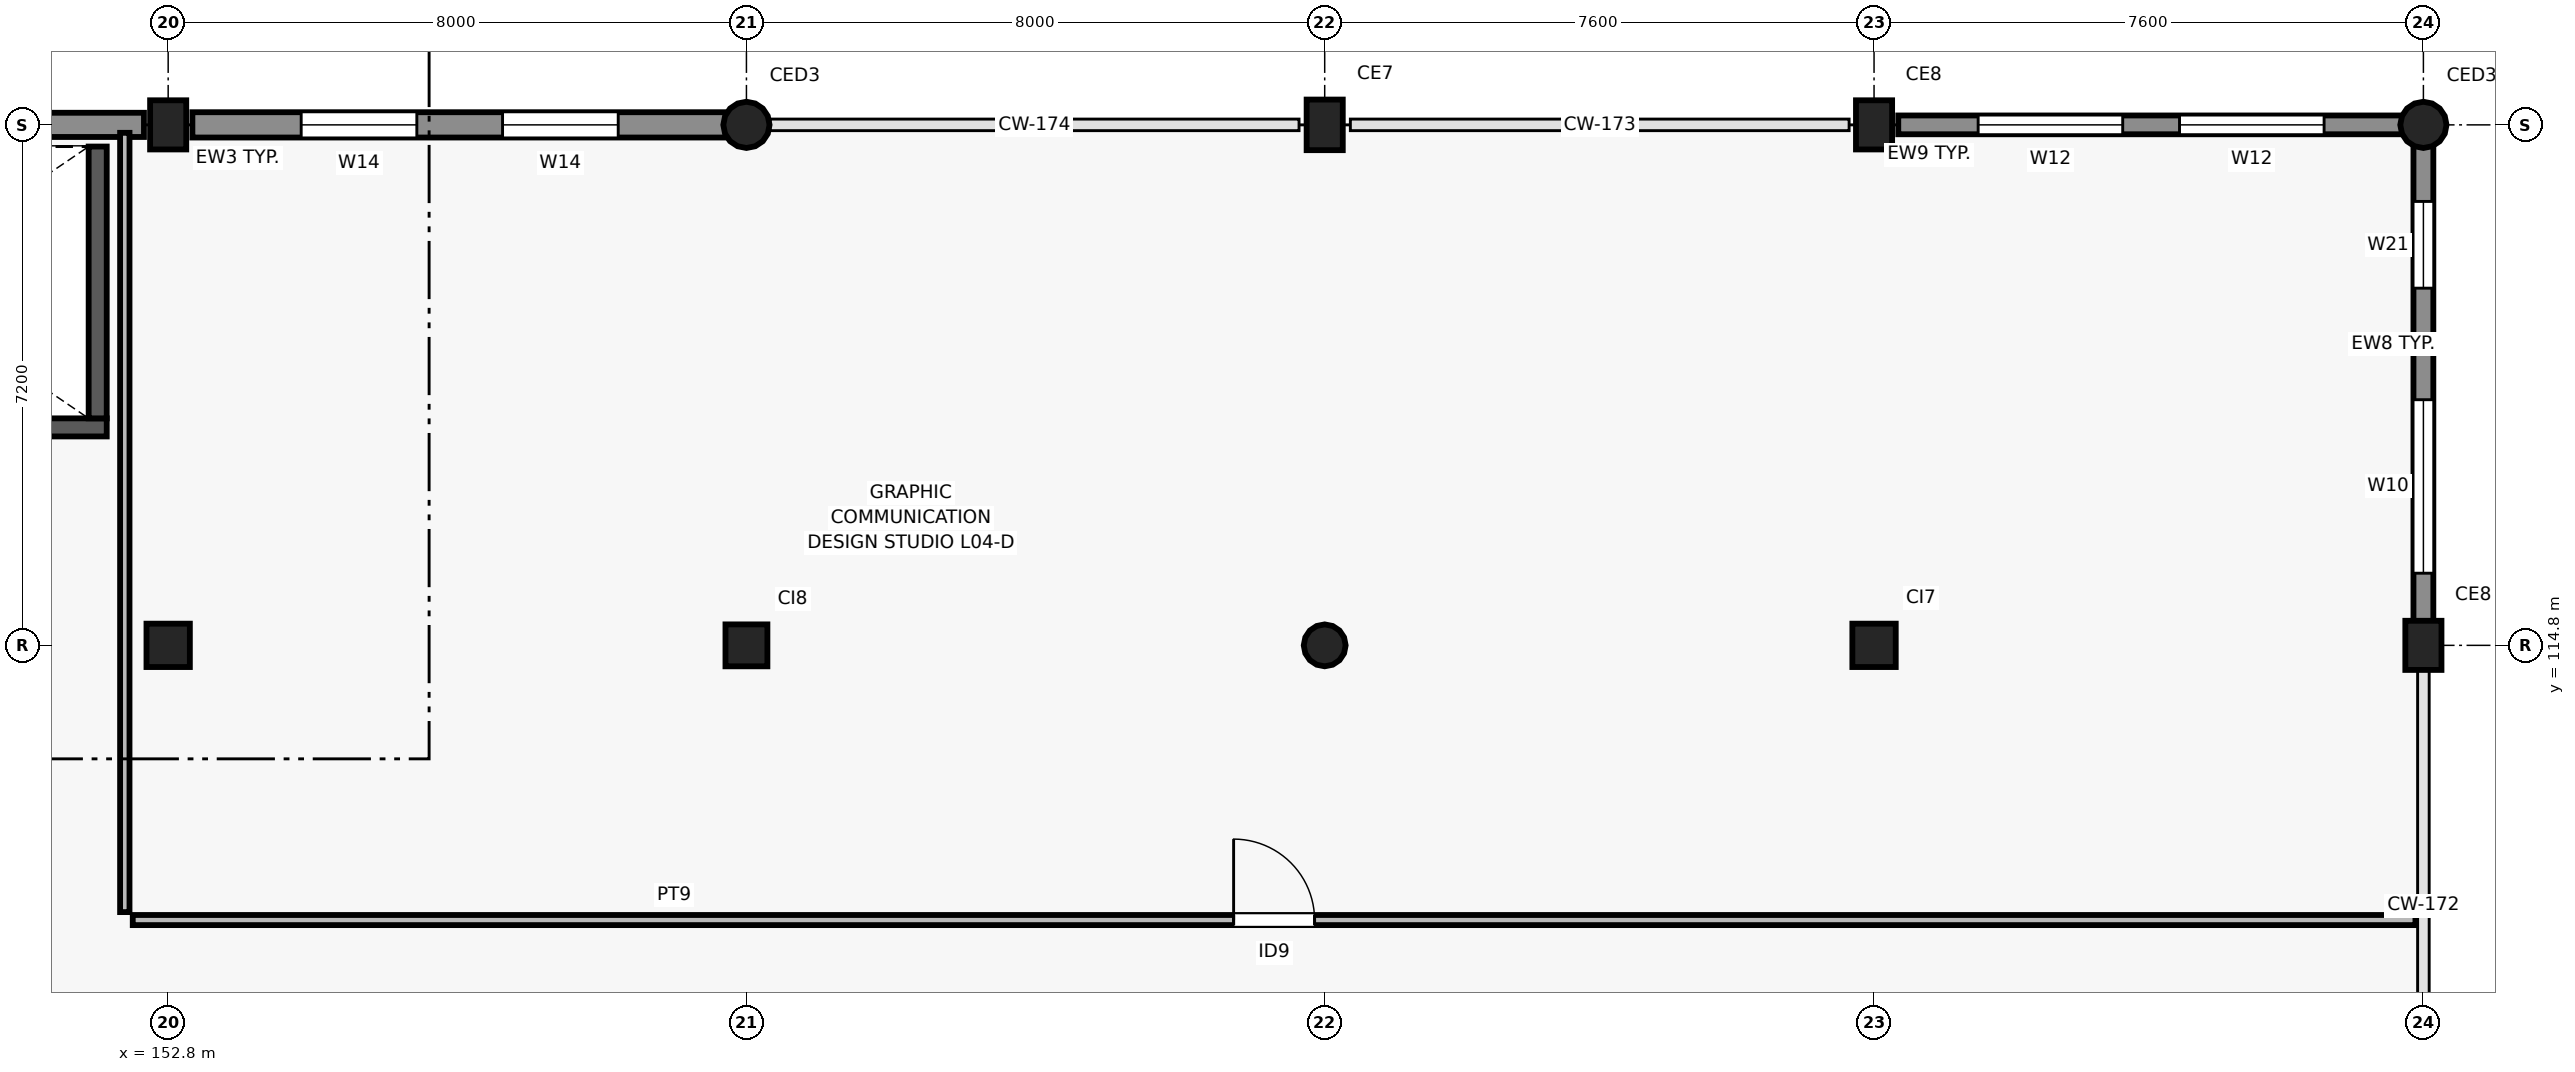
"""IFC4 building model, lengths in metres.
Left out: names, types, materials, properties, quantities, classifications, styles, units other than length and angle.
Written with IfcOpenShell. Run it as: python <this file> out.ifc"""

import sys

from ifc_helpers import new_model, si_unit, direction, frame, frame_2d, origin, origin_2d, place, context, subcontext, project, spatial, rectangle, circle, extrude, element, fill, save


model = new_model("IFC4")
c1 = context("Model", 3, precision=1e-05, world=origin(), true_north=direction((0.0, 1.0)))
c2 = subcontext(c1, "Body", "Model", "MODEL_VIEW")
j1 = project(units=[si_unit("LENGTHUNIT", "METRE"), si_unit("PLANEANGLEUNIT", "RADIAN")], contexts=[c1])
p1 = place(None, origin())
s1 = spatial("IfcSite", under=j1, at=p1, CompositionType="ELEMENT")
p2 = place(p1, origin())
s2 = spatial("IfcBuilding", under=s1, at=p2, CompositionType="ELEMENT")
p3 = place(p2, frame((0.0, 0.0, 17.4)))
s3 = spatial("IfcBuildingStorey", under=s2, at=p3, CompositionType="ELEMENT", Elevation=17.4)
p4 = place(p3, frame((152.8, 114.8, 0.0), z_axis=(0.0, 0.0, 1.0), x_axis=(1.0, 0.0, 0.0)))
e1 = element("IfcColumn", 1, at=p4, inside=s3, PredefinedType="COLUMN", context=c2, shape_type="SweptSolid", body=[
    extrude(rectangle(XDim=0.6, YDim=0.6, at=origin_2d()), origin(), (0.0, 0.0, 1.0), 4.2),
])
p5 = place(p3, frame((152.8, 122.0, 0.0), z_axis=(0.0, 0.0, 1.0), x_axis=(1.0, 0.0, 0.0)))
e2 = element("IfcColumn", 2, at=p5, inside=s3, PredefinedType="COLUMN", context=c2, shape_type="SweptSolid", body=[
    extrude(rectangle(XDim=0.68, YDim=0.5, at=origin_2d()), origin(), (0.0, 0.0, 1.0), 4.2),
])
p6 = place(p3, frame((160.8, 114.8, 0.0), z_axis=(0.0, 0.0, 1.0), x_axis=(1.0, 0.0, 0.0)))
e3 = element("IfcColumn", 3, at=p6, inside=s3, PredefinedType="COLUMN", context=c2, shape_type="SweptSolid", body=[
    extrude(rectangle(XDim=0.58, YDim=0.58, at=origin_2d()), origin(), (0.0, 0.0, 1.0), 4.2),
])
p7 = place(p3, frame((160.8, 122.0, 0.0), z_axis=(0.0, 0.0, 1.0), x_axis=(1.0, 0.0, 0.0)))
e4 = element("IfcColumn", 4, at=p7, inside=s3, PredefinedType="COLUMN", context=c2, shape_type="SweptSolid", body=[
    extrude(circle(Radius=0.32, at=origin_2d()), origin(), (0.0, 0.0, 1.0), 4.2),
])
p8 = place(p3, frame((168.8, 114.8, 0.0), z_axis=(0.0, 0.0, 1.0), x_axis=(1.0, 0.0, 0.0)))
e5 = element("IfcColumn", 5, at=p8, inside=s3, PredefinedType="COLUMN", context=c2, shape_type="SweptSolid", body=[
    extrude(circle(Radius=0.29, at=origin_2d()), origin(), (0.0, 0.0, 1.0), 4.2),
])
p9 = place(p3, frame((168.8, 122.0, 0.0), z_axis=(0.0, 0.0, 1.0), x_axis=(1.0, 0.0, 0.0)))
e6 = element("IfcColumn", 6, at=p9, inside=s3, PredefinedType="COLUMN", context=c2, shape_type="SweptSolid", body=[
    extrude(rectangle(XDim=0.7, YDim=0.5, at=origin_2d()), origin(), (0.0, 0.0, 1.0), 4.2),
])
p10 = place(p3, frame((176.4, 114.8, 0.0), z_axis=(0.0, 0.0, 1.0), x_axis=(1.0, 0.0, 0.0)))
e7 = element("IfcColumn", 7, at=p10, inside=s3, PredefinedType="COLUMN", context=c2, shape_type="SweptSolid", body=[
    extrude(rectangle(XDim=0.6, YDim=0.6, at=origin_2d()), origin(), (0.0, 0.0, 1.0), 4.2),
])
for number, where, z_axis, x_axis in (
    (8, (176.4, 122.0, 0.0), (0.0, 0.0, 1.0), (1.0, 0.0, 0.0)),
    (9, (184.0, 114.8, 0.0), (0.0, 0.0, 1.0), (1.0, 0.0, 0.0)),
):
    element("IfcColumn", number, at=place(p3, frame(where, z_axis=z_axis, x_axis=x_axis)), inside=s3, PredefinedType="COLUMN", context=c2, shape_type="SweptSolid", body=[
        extrude(rectangle(XDim=0.68, YDim=0.5, at=origin_2d()), origin(), (0.0, 0.0, 1.0), 4.2),
    ])
p11 = place(p3, frame((184.0, 122.0, 0.0), z_axis=(0.0, 0.0, 1.0), x_axis=(1.0, 0.0, 0.0)))
e10 = element("IfcColumn", 10, at=p11, inside=s3, PredefinedType="COLUMN", context=c2, shape_type="SweptSolid", body=[
    extrude(circle(Radius=0.32, at=origin_2d()), origin(), (0.0, 0.0, 1.0), 4.2),
])
p12 = place(p3, frame((184.0, 115.045, 0.0), z_axis=(0.0, 0.0, 1.0), x_axis=(0.0, 1.0, 0.0)))
e11 = element("IfcWall", 11, at=p12, inside=s3, PredefinedType="SOLIDWALL", context=c2, shape_type="SweptSolid", body=[
    extrude(rectangle(XDim=6.686, YDim=0.275, at=frame_2d((3.343, 0.0))), origin(), (0.0, 0.0, 1.0), 3.39),
])
p13 = place(p12, frame((0.753, 0.0, 0.9)))
e12 = element("IfcOpeningElement", 12, at=p13, cuts=e11, PredefinedType="OPENING", context=c2, shape_type="SweptSolid", body=[
    extrude(rectangle(XDim=2.4, YDim=1.5, at=frame_2d((1.2, 0.75))), frame((0.0, 0.147, 0.0), z_axis=(0.0, -1.0, 0.0), x_axis=(1.0, 0.0, 0.0)), (0.0, 0.0, 1.0), 0.295),
])
p14 = place(p12, frame((4.696, 0.0, 0.9)))
e13 = element("IfcOpeningElement", 13, at=p14, cuts=e11, PredefinedType="OPENING", context=c2, shape_type="SweptSolid", body=[
    extrude(rectangle(XDim=1.2, YDim=1.25, at=frame_2d((0.6, 0.625))), frame((0.0, 0.147, 0.0), z_axis=(0.0, -1.0, 0.0), x_axis=(1.0, 0.0, 0.0)), (0.0, 0.0, 1.0), 0.295),
])
p15 = place(p3, frame((183.731, 122.0, 0.0), z_axis=(0.0, 0.0, 1.0), x_axis=(-1.0, 0.0, 0.0)))
e14 = element("IfcWall", 14, at=p15, inside=s3, PredefinedType="SOLIDWALL", context=c2, shape_type="SweptSolid", body=[
    extrude(rectangle(XDim=6.996, YDim=0.26, at=frame_2d((3.498, 0.0))), origin(), (0.0, 0.0, 1.0), 3.29),
])
p16 = place(p15, frame((1.105, 0.0, 0.9)))
e15 = element("IfcOpeningElement", 15, at=p16, cuts=e14, PredefinedType="OPENING", context=c2, shape_type="SweptSolid", body=[
    extrude(rectangle(XDim=2.0, YDim=1.5, at=frame_2d((1.0, 0.75))), frame((0.0, 0.14, 0.0), z_axis=(0.0, -1.0, 0.0), x_axis=(1.0, 0.0, 0.0)), (0.0, 0.0, 1.0), 0.28),
])
p17 = place(p15, frame((3.891, 0.0, 0.9)))
e16 = element("IfcOpeningElement", 16, at=p17, cuts=e14, PredefinedType="OPENING", context=c2, shape_type="SweptSolid", body=[
    extrude(rectangle(XDim=2.0, YDim=1.5, at=frame_2d((1.0, 0.75))), frame((0.0, 0.14, 0.0), z_axis=(0.0, -1.0, 0.0), x_axis=(1.0, 0.0, 0.0)), (0.0, 0.0, 1.0), 0.28),
])
p18 = place(p3, frame((160.531, 122.0, 0.0), z_axis=(0.0, 0.0, 1.0), x_axis=(-1.0, 0.0, 0.0)))
e17 = element("IfcWall", 17, at=p18, inside=s3, PredefinedType="SOLIDWALL", context=c2, shape_type="SweptSolid", body=[
    extrude(rectangle(XDim=7.396, YDim=0.35, at=frame_2d((3.698, 0.0))), origin(), (0.0, 0.0, 1.0), 3.37),
])
p19 = place(p18, frame((1.505, 0.0, 0.9)))
e18 = element("IfcOpeningElement", 18, at=p19, cuts=e17, PredefinedType="OPENING", context=c2, shape_type="SweptSolid", body=[
    extrude(rectangle(XDim=1.6, YDim=1.5, at=frame_2d((0.8, 0.75))), frame((0.0, 0.185, 0.0), z_axis=(0.0, -1.0, 0.0), x_axis=(1.0, 0.0, 0.0)), (0.0, 0.0, 1.0), 0.37),
])
p20 = place(p18, frame((4.291, 0.0, 0.9)))
e19 = element("IfcOpeningElement", 19, at=p20, cuts=e17, PredefinedType="OPENING", context=c2, shape_type="SweptSolid", body=[
    extrude(rectangle(XDim=1.6, YDim=1.5, at=frame_2d((0.8, 0.75))), frame((0.0, 0.185, 0.0), z_axis=(0.0, -1.0, 0.0), x_axis=(1.0, 0.0, 0.0)), (0.0, 0.0, 1.0), 0.37),
])
p21 = place(p3, frame((152.465, 122.0, 0.0), z_axis=(0.0, 0.0, 1.0), x_axis=(-1.0, 0.0, 0.0)))
e20 = element("IfcWall", 20, at=p21, inside=s3, PredefinedType="SOLIDWALL", context=c2, shape_type="SweptSolid", body=[
    extrude(rectangle(XDim=7.32, YDim=0.335, at=frame_2d((3.66, 0.0))), origin(), (0.0, 0.0, 1.0), 3.92),
])
p22 = place(p3, frame((144.05, 117.815, 0.0), z_axis=(0.0, 0.0, 1.0), x_axis=(1.0, 0.0, 0.0)))
e21 = element("IfcWall", 21, at=p22, inside=s3, PredefinedType="SHEAR", context=c2, shape_type="SweptSolid", body=[
    extrude(rectangle(XDim=7.9, YDim=0.25, at=frame_2d((3.95, 0.0))), origin(), (0.0, 0.0, 1.0), 3.92),
])
p23 = place(p22, frame((0.5, 0.0, 0.0)))
e22 = element("IfcOpeningElement", 22, at=p23, cuts=e21, PredefinedType="OPENING", context=c2, shape_type="SweptSolid", body=[
    extrude(rectangle(XDim=1.25, YDim=2.2, at=frame_2d((0.625, 1.1))), frame((0.0, 0.135, 0.0), z_axis=(0.0, -1.0, 0.0), x_axis=(1.0, 0.0, 0.0)), (0.0, 0.0, 1.0), 0.27),
])
p24 = place(p3, frame((151.825, 117.94, 0.0), z_axis=(0.0, 0.0, 1.0), x_axis=(0.0, 1.0, 0.0)))
e23 = element("IfcWall", 23, at=p24, inside=s3, PredefinedType="SHEAR", context=c2, shape_type="SweptSolid", body=[
    extrude(rectangle(XDim=3.76, YDim=0.25, at=frame_2d((1.88, 0.0))), origin(), (0.0, 0.0, 1.0), 3.92),
])
p25 = place(p3, frame((152.31, 111.0, 0.0), z_axis=(0.0, 0.0, 1.0), x_axis=(1.0, 0.0, 0.0)))
e24 = element("IfcWall", 24, at=p25, inside=s3, PredefinedType="PARTITIONING", context=c2, shape_type="SweptSolid", body=[
    extrude(rectangle(XDim=31.58, YDim=0.14, at=frame_2d((15.79, 0.0))), origin(), (0.0, 0.0, 1.0), 3.9),
])
p26 = place(p25, frame((15.23, 0.0, 0.0)))
e25 = element("IfcOpeningElement", 25, at=p26, cuts=e24, PredefinedType="OPENING", context=c2, shape_type="SweptSolid", body=[
    extrude(rectangle(XDim=1.12, YDim=2.2, at=frame_2d((0.56, 1.1))), frame((0.0, 0.08, 0.0), z_axis=(0.0, -1.0, 0.0), x_axis=(1.0, 0.0, 0.0)), (0.0, 0.0, 1.0), 0.16),
])
p27 = place(p3, frame((152.2, 111.11, 0.0), z_axis=(0.0, 0.0, 1.0), x_axis=(0.0, 1.0, 0.0)))
e26 = element("IfcWall", 26, at=p27, inside=s3, PredefinedType="PARTITIONING", context=c2, shape_type="SweptSolid", body=[
    extrude(rectangle(XDim=10.78, YDim=0.13, at=frame_2d((5.39, 0.0))), origin(), (0.0, 0.0, 1.0), 3.9),
])
p28 = place(p13, origin())
e27 = element("IfcWindow", 27, at=p28, inside=s3, PartitioningType="SINGLE_PANEL", PredefinedType="WINDOW", context=c2, shape_type="SweptSolid", body=[
    extrude(rectangle(XDim=2.4, YDim=1.5, at=frame_2d((1.2, 0.75))), frame((0.0, 0.03, 0.0), z_axis=(0.0, -1.0, 0.0), x_axis=(1.0, 0.0, 0.0)), (0.0, 0.0, 1.0), 0.06),
])
fill(e12, e27)
p29 = place(p14, origin())
e28 = element("IfcWindow", 28, at=p29, inside=s3, PartitioningType="SINGLE_PANEL", PredefinedType="WINDOW", context=c2, shape_type="SweptSolid", body=[
    extrude(rectangle(XDim=1.2, YDim=1.25, at=frame_2d((0.6, 0.625))), frame((0.0, 0.03, 0.0), z_axis=(0.0, -1.0, 0.0), x_axis=(1.0, 0.0, 0.0)), (0.0, 0.0, 1.0), 0.06),
])
fill(e13, e28)
p30 = place(p16, origin())
e29 = element("IfcWindow", 29, at=p30, inside=s3, PartitioningType="SINGLE_PANEL", PredefinedType="WINDOW", context=c2, shape_type="SweptSolid", body=[
    extrude(rectangle(XDim=2.0, YDim=1.5, at=frame_2d((1.0, 0.75))), frame((0.0, 0.03, 0.0), z_axis=(0.0, -1.0, 0.0), x_axis=(1.0, 0.0, 0.0)), (0.0, 0.0, 1.0), 0.06),
])
fill(e15, e29)
p31 = place(p17, origin())
e30 = element("IfcWindow", 30, at=p31, inside=s3, PartitioningType="SINGLE_PANEL", PredefinedType="WINDOW", context=c2, shape_type="SweptSolid", body=[
    extrude(rectangle(XDim=2.0, YDim=1.5, at=frame_2d((1.0, 0.75))), frame((0.0, 0.03, 0.0), z_axis=(0.0, -1.0, 0.0), x_axis=(1.0, 0.0, 0.0)), (0.0, 0.0, 1.0), 0.06),
])
fill(e16, e30)
p32 = place(p19, origin())
e31 = element("IfcWindow", 31, at=p32, inside=s3, PartitioningType="SINGLE_PANEL", PredefinedType="WINDOW", context=c2, shape_type="SweptSolid", body=[
    extrude(rectangle(XDim=1.6, YDim=1.5, at=frame_2d((0.8, 0.75))), frame((0.0, 0.03, 0.0), z_axis=(0.0, -1.0, 0.0), x_axis=(1.0, 0.0, 0.0)), (0.0, 0.0, 1.0), 0.06),
])
fill(e18, e31)
p33 = place(p20, origin())
e32 = element("IfcWindow", 32, at=p33, inside=s3, PartitioningType="SINGLE_PANEL", PredefinedType="WINDOW", context=c2, shape_type="SweptSolid", body=[
    extrude(rectangle(XDim=1.6, YDim=1.5, at=frame_2d((0.8, 0.75))), frame((0.0, 0.03, 0.0), z_axis=(0.0, -1.0, 0.0), x_axis=(1.0, 0.0, 0.0)), (0.0, 0.0, 1.0), 0.06),
])
fill(e19, e32)
p34 = place(p26, origin())
e33 = element("IfcDoor", 33, at=p34, inside=s3, OperationType="SINGLE_SWING_LEFT", PredefinedType="DOOR", context=c2, shape_type="SweptSolid", body=[
    extrude(rectangle(XDim=1.12, YDim=2.2, at=frame_2d((0.56, 1.1))), frame((0.0, 0.025, 0.0), z_axis=(0.0, -1.0, 0.0), x_axis=(1.0, 0.0, 0.0)), (0.0, 0.0, 1.0), 0.05),
])
fill(e25, e33)
save(model, sys.argv[1])
